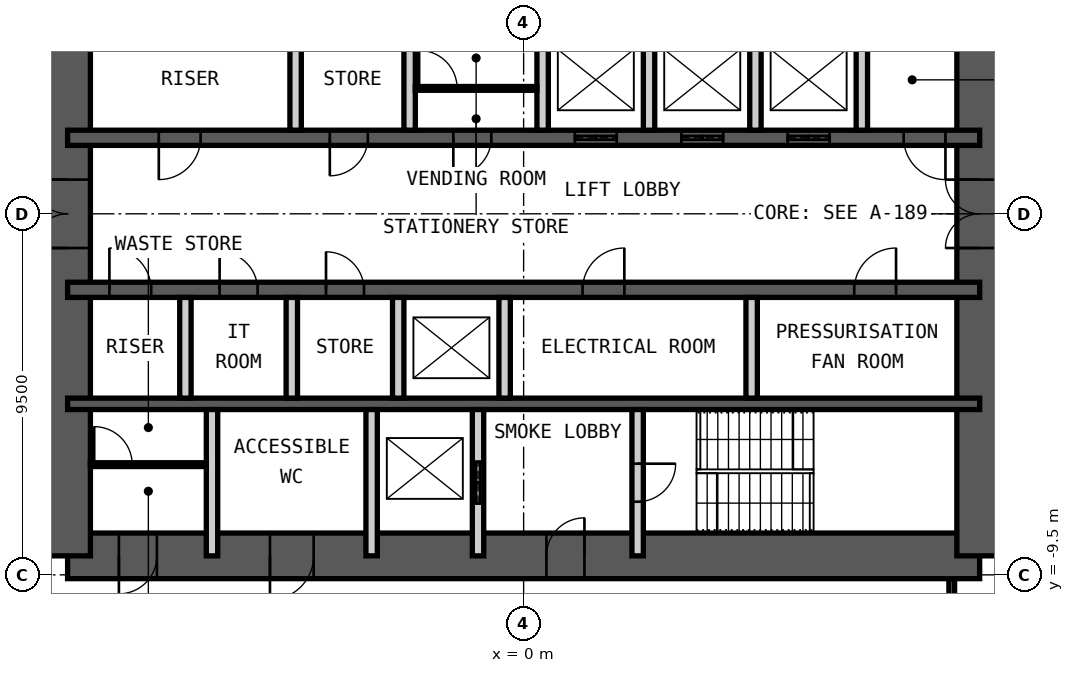
"""IFC4 building model, lengths in metres.
Left out: names, types, materials, properties, quantities, classifications, styles, units other than length and angle.
Written with IfcOpenShell. Run it as: python <this file> out.ifc"""

import sys

from ifc_helpers import new_model, si_unit, direction, frame, frame_2d, origin, place, context, subcontext, project, spatial, rectangle, extrude, element, fill, save


model = new_model("IFC4")
c1 = context("Model", 3, precision=1e-05, world=origin(), true_north=direction((0.0, 1.0)))
c2 = subcontext(c1, "Body", "Model", "MODEL_VIEW")
j1 = project(units=[si_unit("LENGTHUNIT", "METRE"), si_unit("PLANEANGLEUNIT", "RADIAN")], contexts=[c1])
p1 = place(None, origin())
s1 = spatial("IfcSite", under=j1, at=p1, CompositionType="ELEMENT")
p2 = place(p1, origin())
s2 = spatial("IfcBuilding", under=s1, at=p2, CompositionType="ELEMENT")
p3 = place(p2, frame((0.0, 0.0, 218.2)))
s3 = spatial("IfcBuildingStorey", under=s2, at=p3, CompositionType="ELEMENT", Elevation=218.2)
p4 = place(p3, frame((-12.0, -9.0, 0.0), z_axis=(0.0, 0.0, 1.0), x_axis=(1.0, 0.0, 0.0)))
e1 = element("IfcWall", 1, at=p4, inside=s3, PredefinedType="SHEAR", context=c2, shape_type="SweptSolid", body=[
    extrude(rectangle(XDim=24.0, YDim=1.2, at=frame_2d((12.0, 0.0))), origin(), (0.0, 0.0, 1.0), 4.2),
])
p5 = place(p4, frame((1.35, 0.0, 0.0)))
e2 = element("IfcOpeningElement", 2, at=p5, cuts=e1, PredefinedType="OPENING", context=c2, shape_type="SweptSolid", body=[
    extrude(rectangle(XDim=1.0, YDim=2.1, at=frame_2d((0.5, 1.05))), frame((0.0, 0.61, 0.0), z_axis=(0.0, -1.0, 0.0), x_axis=(1.0, 0.0, 0.0)), (0.0, 0.0, 1.0), 1.22),
])
p6 = place(p4, frame((5.325, 0.0, 0.0)))
e3 = element("IfcOpeningElement", 3, at=p6, cuts=e1, PredefinedType="OPENING", context=c2, shape_type="SweptSolid", body=[
    extrude(rectangle(XDim=1.15, YDim=2.1, at=frame_2d((0.575, 1.05))), frame((0.0, 0.61, 0.0), z_axis=(0.0, -1.0, 0.0), x_axis=(1.0, 0.0, 0.0)), (0.0, 0.0, 1.0), 1.22),
])
p7 = place(p4, frame((12.6, 0.0, 0.0)))
e4 = element("IfcOpeningElement", 4, at=p7, cuts=e1, PredefinedType="OPENING", context=c2, shape_type="SweptSolid", body=[
    extrude(rectangle(XDim=1.0, YDim=2.1, at=frame_2d((0.5, 1.05))), frame((0.0, 0.61, 0.0), z_axis=(0.0, -1.0, 0.0), x_axis=(1.0, 0.0, 0.0)), (0.0, 0.0, 1.0), 1.22),
])
p8 = place(p3, frame((12.0, -9.0, 0.0), z_axis=(0.0, 0.0, 1.0), x_axis=(0.0, 1.0, 0.0)))
e5 = element("IfcWall", 5, at=p8, inside=s3, PredefinedType="SHEAR", context=c2, shape_type="SweptSolid", body=[
    extrude(rectangle(XDim=18.0, YDim=1.2, at=frame_2d((9.0, 0.0))), origin(), (0.0, 0.0, 1.0), 4.2),
])
p9 = place(p8, frame((8.1, 0.0, 0.0)))
e6 = element("IfcOpeningElement", 6, at=p9, cuts=e5, PredefinedType="OPENING", context=c2, shape_type="SweptSolid", body=[
    extrude(rectangle(XDim=1.8, YDim=2.1, at=frame_2d((0.9, 1.05))), frame((0.0, 0.61, 0.0), z_axis=(0.0, -1.0, 0.0), x_axis=(1.0, 0.0, 0.0)), (0.0, 0.0, 1.0), 1.22),
])
p10 = place(p3, frame((-12.0, -9.0, 0.0), z_axis=(0.0, 0.0, 1.0), x_axis=(0.0, 1.0, 0.0)))
e7 = element("IfcWall", 7, at=p10, inside=s3, PredefinedType="SHEAR", context=c2, shape_type="SweptSolid", body=[
    extrude(rectangle(XDim=18.0, YDim=1.2, at=frame_2d((9.0, 0.0))), origin(), (0.0, 0.0, 1.0), 4.2),
])
p11 = place(p10, frame((8.1, 0.0, 0.0)))
e8 = element("IfcOpeningElement", 8, at=p11, cuts=e7, PredefinedType="OPENING", context=c2, shape_type="SweptSolid", body=[
    extrude(rectangle(XDim=1.8, YDim=2.1, at=frame_2d((0.9, 1.05))), frame((0.0, 0.61, 0.0), z_axis=(0.0, -1.0, 0.0), x_axis=(1.0, 0.0, 0.0)), (0.0, 0.0, 1.0), 1.22),
])
p12 = place(p3, frame((-12.0, 2.0, 0.0), z_axis=(0.0, 0.0, 1.0), x_axis=(1.0, 0.0, 0.0)))
e9 = element("IfcWall", 9, at=p12, inside=s3, PredefinedType="SHEAR", context=c2, shape_type="SweptSolid", body=[
    extrude(rectangle(XDim=24.0, YDim=0.4, at=frame_2d((12.0, 0.0))), origin(), (0.0, 0.0, 1.0), 4.2),
])
p13 = place(p12, frame((2.4, 0.0, 0.0)))
e10 = element("IfcOpeningElement", 10, at=p13, cuts=e9, PredefinedType="OPENING", context=c2, shape_type="SweptSolid", body=[
    extrude(rectangle(XDim=1.1, YDim=2.1, at=frame_2d((0.55, 1.05))), frame((0.0, 0.21, 0.0), z_axis=(0.0, -1.0, 0.0), x_axis=(1.0, 0.0, 0.0)), (0.0, 0.0, 1.0), 0.42),
])
p14 = place(p12, frame((22.0, 0.0, 0.0)))
e11 = element("IfcOpeningElement", 11, at=p14, cuts=e9, PredefinedType="OPENING", context=c2, shape_type="SweptSolid", body=[
    extrude(rectangle(XDim=1.1, YDim=2.1, at=frame_2d((0.55, 1.05))), frame((0.0, 0.21, 0.0), z_axis=(0.0, -1.0, 0.0), x_axis=(1.0, 0.0, 0.0)), (0.0, 0.0, 1.0), 0.42),
])
p15 = place(p12, frame((10.15, 0.0, 0.0)))
e12 = element("IfcOpeningElement", 12, at=p15, cuts=e9, PredefinedType="OPENING", context=c2, shape_type="SweptSolid", body=[
    extrude(rectangle(XDim=1.0, YDim=2.1, at=frame_2d((0.5, 1.05))), frame((0.0, 0.21, 0.0), z_axis=(0.0, -1.0, 0.0), x_axis=(1.0, 0.0, 0.0)), (0.0, 0.0, 1.0), 0.42),
])
p16 = place(p12, frame((6.9, 0.0, 0.0)))
e13 = element("IfcOpeningElement", 13, at=p16, cuts=e9, PredefinedType="OPENING", context=c2, shape_type="SweptSolid", body=[
    extrude(rectangle(XDim=1.0, YDim=2.1, at=frame_2d((0.5, 1.05))), frame((0.0, 0.21, 0.0), z_axis=(0.0, -1.0, 0.0), x_axis=(1.0, 0.0, 0.0)), (0.0, 0.0, 1.0), 0.42),
])
p17 = place(p12, frame((13.35, 0.0, 0.0)))
e14 = element("IfcOpeningElement", 14, at=p17, cuts=e9, PredefinedType="OPENING", context=c2, shape_type="SweptSolid", body=[
    extrude(rectangle(XDim=1.1, YDim=2.4, at=frame_2d((0.55, 1.2))), frame((0.0, 0.21, 0.0), z_axis=(0.0, -1.0, 0.0), x_axis=(1.0, 0.0, 0.0)), (0.0, 0.0, 1.0), 0.42),
])
p18 = place(p12, frame((16.15, 0.0, 0.0)))
e15 = element("IfcOpeningElement", 15, at=p18, cuts=e9, PredefinedType="OPENING", context=c2, shape_type="SweptSolid", body=[
    extrude(rectangle(XDim=1.1, YDim=2.4, at=frame_2d((0.55, 1.2))), frame((0.0, 0.21, 0.0), z_axis=(0.0, -1.0, 0.0), x_axis=(1.0, 0.0, 0.0)), (0.0, 0.0, 1.0), 0.42),
])
p19 = place(p12, frame((18.95, 0.0, 0.0)))
e16 = element("IfcOpeningElement", 16, at=p19, cuts=e9, PredefinedType="OPENING", context=c2, shape_type="SweptSolid", body=[
    extrude(rectangle(XDim=1.1, YDim=2.4, at=frame_2d((0.55, 1.2))), frame((0.0, 0.21, 0.0), z_axis=(0.0, -1.0, 0.0), x_axis=(1.0, 0.0, 0.0)), (0.0, 0.0, 1.0), 0.42),
])
p20 = place(p3, frame((-12.0, -2.0, 0.0), z_axis=(0.0, 0.0, 1.0), x_axis=(1.0, 0.0, 0.0)))
e17 = element("IfcWall", 17, at=p20, inside=s3, PredefinedType="SHEAR", context=c2, shape_type="SweptSolid", body=[
    extrude(rectangle(XDim=24.0, YDim=0.4, at=frame_2d((12.0, 0.0))), origin(), (0.0, 0.0, 1.0), 4.2),
])
p21 = place(p20, frame((1.1, 0.0, 0.0)))
e18 = element("IfcOpeningElement", 18, at=p21, cuts=e17, PredefinedType="OPENING", context=c2, shape_type="SweptSolid", body=[
    extrude(rectangle(XDim=1.1, YDim=2.1, at=frame_2d((0.55, 1.05))), frame((0.0, 0.21, 0.0), z_axis=(0.0, -1.0, 0.0), x_axis=(1.0, 0.0, 0.0)), (0.0, 0.0, 1.0), 0.42),
])
p22 = place(p20, frame((13.55, 0.0, 0.0)))
e19 = element("IfcOpeningElement", 19, at=p22, cuts=e17, PredefinedType="OPENING", context=c2, shape_type="SweptSolid", body=[
    extrude(rectangle(XDim=1.1, YDim=2.1, at=frame_2d((0.55, 1.05))), frame((0.0, 0.21, 0.0), z_axis=(0.0, -1.0, 0.0), x_axis=(1.0, 0.0, 0.0)), (0.0, 0.0, 1.0), 0.42),
])
p23 = place(p20, frame((20.7, 0.0, 0.0)))
e20 = element("IfcOpeningElement", 20, at=p23, cuts=e17, PredefinedType="OPENING", context=c2, shape_type="SweptSolid", body=[
    extrude(rectangle(XDim=1.1, YDim=2.1, at=frame_2d((0.55, 1.05))), frame((0.0, 0.21, 0.0), z_axis=(0.0, -1.0, 0.0), x_axis=(1.0, 0.0, 0.0)), (0.0, 0.0, 1.0), 0.42),
])
p24 = place(p20, frame((4.0, 0.0, 0.0)))
e21 = element("IfcOpeningElement", 21, at=p24, cuts=e17, PredefinedType="OPENING", context=c2, shape_type="SweptSolid", body=[
    extrude(rectangle(XDim=1.0, YDim=2.1, at=frame_2d((0.5, 1.05))), frame((0.0, 0.21, 0.0), z_axis=(0.0, -1.0, 0.0), x_axis=(1.0, 0.0, 0.0)), (0.0, 0.0, 1.0), 0.42),
])
p25 = place(p20, frame((6.8, 0.0, 0.0)))
e22 = element("IfcOpeningElement", 22, at=p25, cuts=e17, PredefinedType="OPENING", context=c2, shape_type="SweptSolid", body=[
    extrude(rectangle(XDim=1.0, YDim=2.1, at=frame_2d((0.5, 1.05))), frame((0.0, 0.21, 0.0), z_axis=(0.0, -1.0, 0.0), x_axis=(1.0, 0.0, 0.0)), (0.0, 0.0, 1.0), 0.42),
])
p26 = place(p3, frame((-12.0, -5.0, 0.0), z_axis=(0.0, 0.0, 1.0), x_axis=(1.0, 0.0, 0.0)))
e23 = element("IfcWall", 23, at=p26, inside=s3, PredefinedType="SHEAR", context=c2, shape_type="SweptSolid", body=[
    extrude(rectangle(XDim=24.0, YDim=0.3, at=frame_2d((12.0, 0.0))), origin(), (0.0, 0.0, 1.0), 4.2),
])
for number, where, z_axis, x_axis in (
    (24, (-6.0, 2.2, 0.0), (0.0, 0.0, 1.0), (0.0, 1.0, 0.0)),
    (25, (-3.0, 2.2, 0.0), (0.0, 0.0, 1.0), (0.0, 1.0, 0.0)),
    (26, (0.5, 2.2, 0.0), (0.0, 0.0, 1.0), (0.0, 1.0, 0.0)),
    (27, (3.3, 2.2, 0.0), (0.0, 0.0, 1.0), (0.0, 1.0, 0.0)),
    (28, (6.1, 2.2, 0.0), (0.0, 0.0, 1.0), (0.0, 1.0, 0.0)),
    (29, (8.9, 2.2, 0.0), (0.0, 0.0, 1.0), (0.0, 1.0, 0.0)),
    (30, (-8.9, -4.85, 0.0), (0.0, 0.0, 1.0), (0.0, 1.0, 0.0)),
    (31, (-6.1, -4.85, 0.0), (0.0, 0.0, 1.0), (0.0, 1.0, 0.0)),
    (32, (-3.3, -4.85, 0.0), (0.0, 0.0, 1.0), (0.0, 1.0, 0.0)),
    (33, (-0.5, -4.85, 0.0), (0.0, 0.0, 1.0), (0.0, 1.0, 0.0)),
    (34, (6.0, -4.85, 0.0), (0.0, 0.0, 1.0), (0.0, 1.0, 0.0)),
):
    element("IfcWall", number, at=place(p3, frame(where, z_axis=z_axis, x_axis=x_axis)), inside=s3, PredefinedType="PARTITIONING", context=c2, shape_type="SweptSolid", body=[
        extrude(rectangle(XDim=2.65, YDim=0.3, at=frame_2d((1.325, 0.0))), origin(), (0.0, 0.0, 1.0), 3.98),
    ])
for number, where, z_axis, x_axis in (
    (35, (-8.2, -9.0, 0.0), (0.0, 0.0, 1.0), (0.0, 1.0, 0.0)),
    (36, (-4.0, -9.0, 0.0), (0.0, 0.0, 1.0), (0.0, 1.0, 0.0)),
):
    element("IfcWall", number, at=place(p3, frame(where, z_axis=z_axis, x_axis=x_axis)), inside=s3, PredefinedType="PARTITIONING", context=c2, shape_type="SweptSolid", body=[
        extrude(rectangle(XDim=3.85, YDim=0.3, at=frame_2d((1.925, 0.0))), origin(), (0.0, 0.0, 1.0), 3.98),
    ])
p27 = place(p3, frame((-1.2, -9.0, 0.0), z_axis=(0.0, 0.0, 1.0), x_axis=(0.0, 1.0, 0.0)))
e37 = element("IfcWall", 37, at=p27, inside=s3, PredefinedType="PARTITIONING", context=c2, shape_type="SweptSolid", body=[
    extrude(rectangle(XDim=3.85, YDim=0.3, at=frame_2d((1.925, 0.0))), origin(), (0.0, 0.0, 1.0), 3.98),
])
p28 = place(p27, frame((1.375, 0.0, 0.0)))
e38 = element("IfcOpeningElement", 38, at=p28, cuts=e37, PredefinedType="OPENING", context=c2, shape_type="SweptSolid", body=[
    extrude(rectangle(XDim=1.1, YDim=2.4, at=frame_2d((0.55, 1.2))), frame((0.0, 0.16, 0.0), z_axis=(0.0, -1.0, 0.0), x_axis=(1.0, 0.0, 0.0)), (0.0, 0.0, 1.0), 0.32),
])
p29 = place(p3, frame((3.0, -9.0, 0.0), z_axis=(0.0, 0.0, 1.0), x_axis=(0.0, 1.0, 0.0)))
e39 = element("IfcWall", 39, at=p29, inside=s3, PredefinedType="PARTITIONING", context=c2, shape_type="SweptSolid", body=[
    extrude(rectangle(XDim=3.85, YDim=0.3, at=frame_2d((1.925, 0.0))), origin(), (0.0, 0.0, 1.0), 3.98),
])
p30 = place(p29, frame((1.425, 0.0, 0.0)))
e40 = element("IfcOpeningElement", 40, at=p30, cuts=e39, PredefinedType="OPENING", context=c2, shape_type="SweptSolid", body=[
    extrude(rectangle(XDim=1.0, YDim=2.1, at=frame_2d((0.5, 1.05))), frame((0.0, 0.16, 0.0), z_axis=(0.0, -1.0, 0.0), x_axis=(1.0, 0.0, 0.0)), (0.0, 0.0, 1.0), 0.32),
])
p31 = place(p3, frame((-2.85, 3.3, 0.0), z_axis=(0.0, 0.0, 1.0), x_axis=(1.0, 0.0, 0.0)))
e41 = element("IfcWall", 41, at=p31, inside=s3, PredefinedType="PARTITIONING", context=c2, shape_type="SweptSolid", body=[
    extrude(rectangle(XDim=3.2, YDim=0.1, at=frame_2d((1.6, 0.0))), origin(), (0.0, 0.0, 1.0), 3.98),
])
p32 = place(p31, frame((0.1, 0.0, 0.0)))
e42 = element("IfcOpeningElement", 42, at=p32, cuts=e41, PredefinedType="OPENING", context=c2, shape_type="SweptSolid", body=[
    extrude(rectangle(XDim=1.0, YDim=2.4, at=frame_2d((0.5, 1.2))), frame((0.0, 0.06, 0.0), z_axis=(0.0, -1.0, 0.0), x_axis=(1.0, 0.0, 0.0)), (0.0, 0.0, 1.0), 0.12),
])
p33 = place(p3, frame((-11.4, -6.6, 0.0), z_axis=(0.0, 0.0, 1.0), x_axis=(1.0, 0.0, 0.0)))
e43 = element("IfcWall", 43, at=p33, inside=s3, PredefinedType="PARTITIONING", context=c2, shape_type="SweptSolid", body=[
    extrude(rectangle(XDim=3.05, YDim=0.1, at=frame_2d((1.525, 0.0))), origin(), (0.0, 0.0, 1.0), 3.98),
])
p34 = place(p33, frame((0.1, 0.0, 0.0)))
e44 = element("IfcOpeningElement", 44, at=p34, cuts=e43, PredefinedType="OPENING", context=c2, shape_type="SweptSolid", body=[
    extrude(rectangle(XDim=1.0, YDim=2.4, at=frame_2d((0.5, 1.2))), frame((0.0, 0.06, 0.0), z_axis=(0.0, -1.0, 0.0), x_axis=(1.0, 0.0, 0.0)), (0.0, 0.0, 1.0), 0.12),
])
p35 = place(p3, frame((11.266, -9.6, 0.0), z_axis=(0.0, 0.0, 1.0), x_axis=(0.0, -1.0, 0.0)))
e45 = element("IfcWall", 45, at=p35, inside=s3, PredefinedType="PARTITIONING", context=c2, shape_type="SweptSolid", body=[
    extrude(rectangle(XDim=1.875, YDim=0.15, at=frame_2d((0.938, 0.0))), origin(), (0.0, 0.0, 1.0), 4.03),
])
p36 = place(p5, origin())
e46 = element("IfcDoor", 46, at=p36, inside=s3, OperationType="SINGLE_SWING_LEFT", PredefinedType="DOOR", context=c2, shape_type="SweptSolid", body=[
    extrude(rectangle(XDim=1.0, YDim=2.1, at=frame_2d((0.5, 1.05))), frame((0.0, 0.025, 0.0), z_axis=(0.0, -1.0, 0.0), x_axis=(1.0, 0.0, 0.0)), (0.0, 0.0, 1.0), 0.05),
])
fill(e2, e46)
p37 = place(p6, origin())
e47 = element("IfcDoor", 47, at=p37, inside=s3, OperationType="SINGLE_SWING_LEFT", PredefinedType="DOOR", context=c2, shape_type="SweptSolid", body=[
    extrude(rectangle(XDim=1.15, YDim=2.1, at=frame_2d((0.575, 1.05))), frame((0.0, 0.025, 0.0), z_axis=(0.0, -1.0, 0.0), x_axis=(1.0, 0.0, 0.0)), (0.0, 0.0, 1.0), 0.05),
])
fill(e3, e47)
p38 = place(p7, origin())
e48 = element("IfcDoor", 48, at=p38, inside=s3, OperationType="SINGLE_SWING_LEFT", PredefinedType="DOOR", context=c2, shape_type="SweptSolid", body=[
    extrude(rectangle(XDim=1.0, YDim=2.1, at=frame_2d((0.5, 1.05))), frame((0.0, 0.025, 0.0), z_axis=(0.0, -1.0, 0.0), x_axis=(1.0, 0.0, 0.0)), (0.0, 0.0, 1.0), 0.05),
])
fill(e4, e48)
p39 = place(p30, origin())
e49 = element("IfcDoor", 49, at=p39, inside=s3, OperationType="SINGLE_SWING_RIGHT", PredefinedType="DOOR", context=c2, shape_type="SweptSolid", body=[
    extrude(rectangle(XDim=1.0, YDim=2.1, at=frame_2d((0.5, 1.05))), frame((0.0, 0.025, 0.0), z_axis=(0.0, -1.0, 0.0), x_axis=(1.0, 0.0, 0.0)), (0.0, 0.0, 1.0), 0.05),
])
fill(e40, e49)
p40 = place(p13, origin())
e50 = element("IfcDoor", 50, at=p40, inside=s3, OperationType="SINGLE_SWING_LEFT", PredefinedType="DOOR", context=c2, shape_type="SweptSolid", body=[
    extrude(rectangle(XDim=1.1, YDim=2.1, at=frame_2d((0.55, 1.05))), frame((0.0, 0.025, 0.0), z_axis=(0.0, -1.0, 0.0), x_axis=(1.0, 0.0, 0.0)), (0.0, 0.0, 1.0), 0.05),
])
fill(e10, e50)
p41 = place(p21, origin())
e51 = element("IfcDoor", 51, at=p41, inside=s3, OperationType="SINGLE_SWING_RIGHT", PredefinedType="DOOR", context=c2, shape_type="SweptSolid", body=[
    extrude(rectangle(XDim=1.1, YDim=2.1, at=frame_2d((0.55, 1.05))), frame((0.0, 0.025, 0.0), z_axis=(0.0, -1.0, 0.0), x_axis=(1.0, 0.0, 0.0)), (0.0, 0.0, 1.0), 0.05),
])
fill(e18, e51)
p42 = place(p14, origin())
e52 = element("IfcDoor", 52, at=p42, inside=s3, OperationType="SINGLE_SWING_RIGHT", PredefinedType="DOOR", context=c2, shape_type="SweptSolid", body=[
    extrude(rectangle(XDim=1.1, YDim=2.1, at=frame_2d((0.55, 1.05))), frame((0.0, 0.025, 0.0), z_axis=(0.0, -1.0, 0.0), x_axis=(1.0, 0.0, 0.0)), (0.0, 0.0, 1.0), 0.05),
])
fill(e11, e52)
p43 = place(p15, origin())
e53 = element("IfcDoor", 53, at=p43, inside=s3, OperationType="SINGLE_SWING_LEFT", PredefinedType="DOOR", context=c2, shape_type="SweptSolid", body=[
    extrude(rectangle(XDim=1.0, YDim=2.1, at=frame_2d((0.5, 1.05))), frame((0.0, 0.025, 0.0), z_axis=(0.0, -1.0, 0.0), x_axis=(1.0, 0.0, 0.0)), (0.0, 0.0, 1.0), 0.05),
])
fill(e12, e53)
p44 = place(p22, origin())
e54 = element("IfcDoor", 54, at=p44, inside=s3, OperationType="SINGLE_SWING_LEFT", PredefinedType="DOOR", context=c2, shape_type="SweptSolid", body=[
    extrude(rectangle(XDim=1.1, YDim=2.1, at=frame_2d((0.55, 1.05))), frame((0.0, 0.025, 0.0), z_axis=(0.0, -1.0, 0.0), x_axis=(1.0, 0.0, 0.0)), (0.0, 0.0, 1.0), 0.05),
])
fill(e19, e54)
p45 = place(p23, origin())
e55 = element("IfcDoor", 55, at=p45, inside=s3, OperationType="SINGLE_SWING_LEFT", PredefinedType="DOOR", context=c2, shape_type="SweptSolid", body=[
    extrude(rectangle(XDim=1.1, YDim=2.1, at=frame_2d((0.55, 1.05))), frame((0.0, 0.025, 0.0), z_axis=(0.0, -1.0, 0.0), x_axis=(1.0, 0.0, 0.0)), (0.0, 0.0, 1.0), 0.05),
])
fill(e20, e55)
p46 = place(p9, origin())
e56 = element("IfcDoor", 56, at=p46, inside=s3, OperationType="DOUBLE_DOOR_DOUBLE_SWING", PredefinedType="DOOR", context=c2, shape_type="SweptSolid", body=[
    extrude(rectangle(XDim=1.8, YDim=2.1, at=frame_2d((0.9, 1.05))), frame((0.0, 0.025, 0.0), z_axis=(0.0, -1.0, 0.0), x_axis=(1.0, 0.0, 0.0)), (0.0, 0.0, 1.0), 0.05),
])
fill(e6, e56)
p47 = place(p11, origin())
e57 = element("IfcDoor", 57, at=p47, inside=s3, OperationType="DOUBLE_DOOR_DOUBLE_SWING", PredefinedType="DOOR", context=c2, shape_type="SweptSolid", body=[
    extrude(rectangle(XDim=1.8, YDim=2.1, at=frame_2d((0.9, 1.05))), frame((0.0, 0.025, 0.0), z_axis=(0.0, -1.0, 0.0), x_axis=(1.0, 0.0, 0.0)), (0.0, 0.0, 1.0), 0.05),
])
fill(e8, e57)
p48 = place(p28, origin())
e58 = element("IfcDoor", 58, at=p48, inside=s3, OperationType="DOUBLE_DOOR_SLIDING", PredefinedType="DOOR", context=c2, shape_type="SweptSolid", body=[
    extrude(rectangle(XDim=1.1, YDim=2.4, at=frame_2d((0.55, 1.2))), frame((0.0, 0.025, 0.0), z_axis=(0.0, -1.0, 0.0), x_axis=(1.0, 0.0, 0.0)), (0.0, 0.0, 1.0), 0.05),
])
fill(e38, e58)
p49 = place(p16, origin())
e59 = element("IfcDoor", 59, at=p49, inside=s3, OperationType="SINGLE_SWING_LEFT", PredefinedType="DOOR", context=c2, shape_type="SweptSolid", body=[
    extrude(rectangle(XDim=1.0, YDim=2.1, at=frame_2d((0.5, 1.05))), frame((0.0, 0.025, 0.0), z_axis=(0.0, -1.0, 0.0), x_axis=(1.0, 0.0, 0.0)), (0.0, 0.0, 1.0), 0.05),
])
fill(e13, e59)
p50 = place(p17, origin())
e60 = element("IfcDoor", 60, at=p50, inside=s3, OperationType="DOUBLE_DOOR_SLIDING", PredefinedType="DOOR", context=c2, shape_type="SweptSolid", body=[
    extrude(rectangle(XDim=1.1, YDim=2.4, at=frame_2d((0.55, 1.2))), frame((0.0, 0.025, 0.0), z_axis=(0.0, -1.0, 0.0), x_axis=(1.0, 0.0, 0.0)), (0.0, 0.0, 1.0), 0.05),
])
fill(e14, e60)
p51 = place(p18, origin())
e61 = element("IfcDoor", 61, at=p51, inside=s3, OperationType="DOUBLE_DOOR_SLIDING", PredefinedType="DOOR", context=c2, shape_type="SweptSolid", body=[
    extrude(rectangle(XDim=1.1, YDim=2.4, at=frame_2d((0.55, 1.2))), frame((0.0, 0.025, 0.0), z_axis=(0.0, -1.0, 0.0), x_axis=(1.0, 0.0, 0.0)), (0.0, 0.0, 1.0), 0.05),
])
fill(e15, e61)
p52 = place(p19, origin())
e62 = element("IfcDoor", 62, at=p52, inside=s3, OperationType="DOUBLE_DOOR_SLIDING", PredefinedType="DOOR", context=c2, shape_type="SweptSolid", body=[
    extrude(rectangle(XDim=1.1, YDim=2.4, at=frame_2d((0.55, 1.2))), frame((0.0, 0.025, 0.0), z_axis=(0.0, -1.0, 0.0), x_axis=(1.0, 0.0, 0.0)), (0.0, 0.0, 1.0), 0.05),
])
fill(e16, e62)
p53 = place(p24, origin())
e63 = element("IfcDoor", 63, at=p53, inside=s3, OperationType="SINGLE_SWING_RIGHT", PredefinedType="DOOR", context=c2, shape_type="SweptSolid", body=[
    extrude(rectangle(XDim=1.0, YDim=2.1, at=frame_2d((0.5, 1.05))), frame((0.0, 0.025, 0.0), z_axis=(0.0, -1.0, 0.0), x_axis=(1.0, 0.0, 0.0)), (0.0, 0.0, 1.0), 0.05),
])
fill(e21, e63)
p54 = place(p25, origin())
e64 = element("IfcDoor", 64, at=p54, inside=s3, OperationType="SINGLE_SWING_RIGHT", PredefinedType="DOOR", context=c2, shape_type="SweptSolid", body=[
    extrude(rectangle(XDim=1.0, YDim=2.1, at=frame_2d((0.5, 1.05))), frame((0.0, 0.025, 0.0), z_axis=(0.0, -1.0, 0.0), x_axis=(1.0, 0.0, 0.0)), (0.0, 0.0, 1.0), 0.05),
])
fill(e22, e64)
p55 = place(p32, origin())
e65 = element("IfcDoor", 65, at=p55, inside=s3, OperationType="SINGLE_SWING_RIGHT", PredefinedType="DOOR", context=c2, shape_type="SweptSolid", body=[
    extrude(rectangle(XDim=1.0, YDim=2.4, at=frame_2d((0.5, 1.2))), frame((0.0, 0.025, 0.0), z_axis=(0.0, -1.0, 0.0), x_axis=(1.0, 0.0, 0.0)), (0.0, 0.0, 1.0), 0.05),
])
fill(e42, e65)
p56 = place(p34, origin())
e66 = element("IfcDoor", 66, at=p56, inside=s3, OperationType="SINGLE_SWING_RIGHT", PredefinedType="DOOR", context=c2, shape_type="SweptSolid", body=[
    extrude(rectangle(XDim=1.0, YDim=2.4, at=frame_2d((0.5, 1.2))), frame((0.0, 0.025, 0.0), z_axis=(0.0, -1.0, 0.0), x_axis=(1.0, 0.0, 0.0)), (0.0, 0.0, 1.0), 0.05),
])
fill(e44, e66)
save(model, sys.argv[1])
